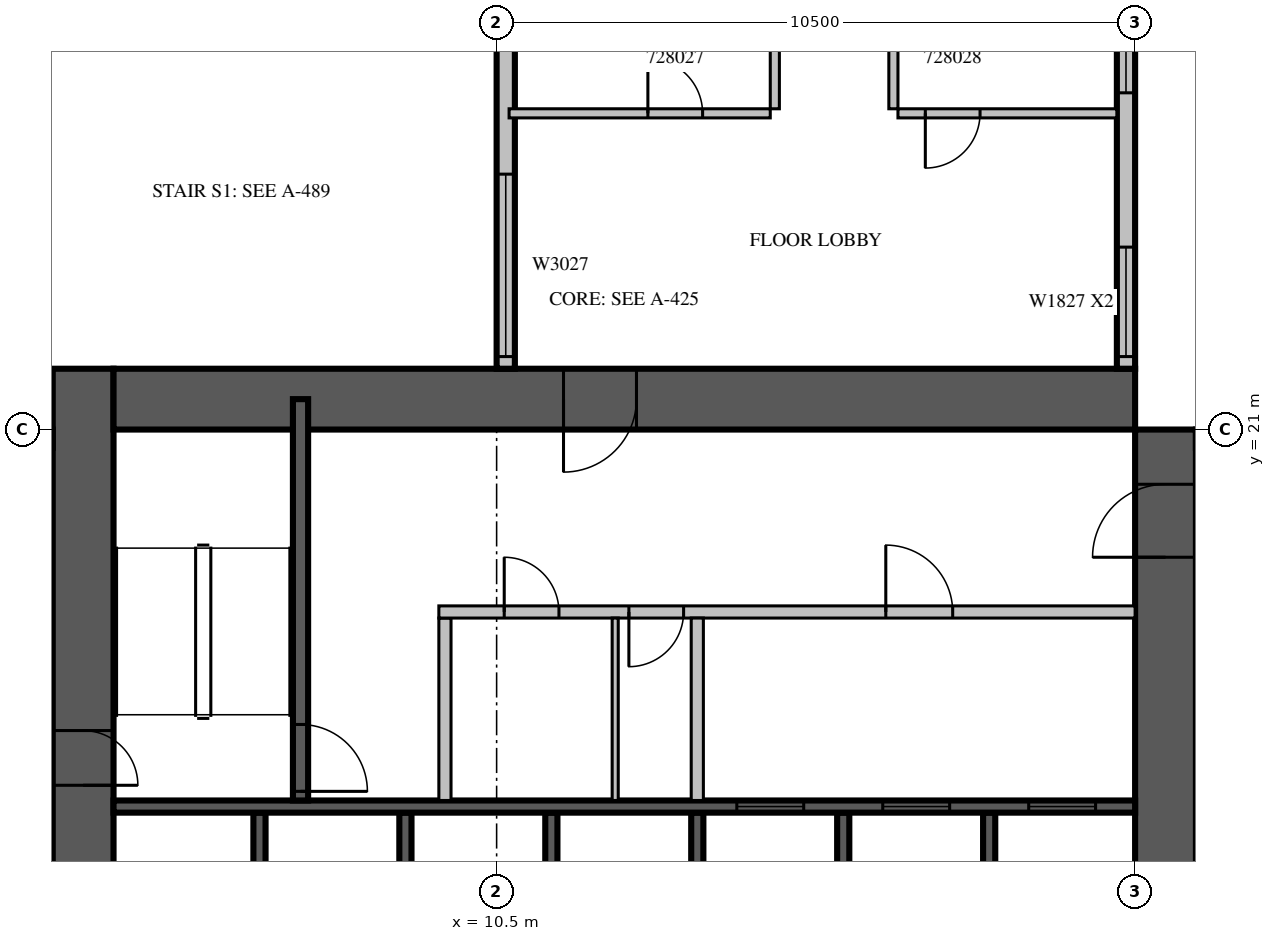
"""IFC4 building model, lengths in metres.
Left out: names, types, materials, properties, quantities, classifications, styles, units other than length and angle.
Written with IfcOpenShell. Run it as: python <this file> out.ifc"""

import sys

from ifc_helpers import new_model, si_unit, direction, frame, frame_2d, origin, place, context, subcontext, project, spatial, rectangle, extrude, source, transform, mapped, element, fill, save


model = new_model("IFC4")
c1 = context("Model", 3, precision=1e-05, world=origin(), true_north=direction((0.0, 1.0)))
c2 = subcontext(c1, "Body", "Model", "MODEL_VIEW")
j1 = project(units=[si_unit("LENGTHUNIT", "METRE"), si_unit("PLANEANGLEUNIT", "RADIAN")], contexts=[c1])
p1 = place(None, origin())
s1 = spatial("IfcSite", under=j1, at=p1, CompositionType="ELEMENT")
p2 = place(p1, origin())
s2 = spatial("IfcBuilding", under=s1, at=p2, CompositionType="ELEMENT")
p3 = place(p2, frame((0.0, 0.0, 128.7)))
s3 = spatial("IfcBuildingStorey", under=s2, at=p3, CompositionType="ELEMENT", Elevation=128.7)
m1 = source(origin(), c2, "Body", "SweptSolid", [
    extrude(rectangle(XDim=17.8, YDim=1.0, at=frame_2d((8.9, 0.0))), origin(), (0.0, 0.0, 1.0), 4.2),
])
p4 = place(p3, frame((3.7, 4.2, 0.0), z_axis=(0.0, 0.0, 1.0), x_axis=(0.0, 1.0, 0.0)))
e1 = element("IfcWall", 1, at=p4, inside=s3, PredefinedType="SHEAR", context=c2, shape_type="MappedRepresentation", body=[
    mapped(m1, transform((0.0, 0.0, 0.0), scale=1.0)),
])
m2 = source(origin(), c2, "Body", "SweptSolid", [
    extrude(rectangle(XDim=2.2, YDim=2.1, at=frame_2d((1.1, 1.05))), frame((0.0, 0.51, 0.0), z_axis=(0.0, -1.0, 0.0), x_axis=(1.0, 0.0, 0.0)), (0.0, 0.0, 1.0), 1.02),
])
p5 = place(p4, frame((4.2, 0.0, 0.0)))
e2 = element("IfcOpeningElement", 2, at=p5, cuts=e1, PredefinedType="OPENING", context=c2, shape_type="MappedRepresentation", body=[
    mapped(m2, transform((0.0, 0.0, 0.0), scale=1.0)),
])
m3 = source(origin(), c2, "Body", "SweptSolid", [
    extrude(rectangle(XDim=0.9, YDim=2.1, at=frame_2d((0.45, 1.05))), frame((0.0, 0.51, 0.0), z_axis=(0.0, -1.0, 0.0), x_axis=(1.0, 0.0, 0.0)), (0.0, 0.0, 1.0), 1.02),
])
p6 = place(p4, frame((10.95, 0.0, 0.0)))
e3 = element("IfcOpeningElement", 3, at=p6, cuts=e1, PredefinedType="OPENING", context=c2, shape_type="MappedRepresentation", body=[
    mapped(m3, transform((0.0, 0.0, 0.0), scale=1.0)),
])
m4 = source(origin(), c2, "Body", "SweptSolid", [
    extrude(rectangle(XDim=16.8, YDim=1.0, at=frame_2d((8.4, 0.0))), origin(), (0.0, 0.0, 1.0), 4.2),
])
p7 = place(p3, frame((21.5, 4.2, 0.0), z_axis=(0.0, 0.0, 1.0), x_axis=(0.0, 1.0, 0.0)))
e4 = element("IfcWall", 4, at=p7, inside=s3, PredefinedType="SHEAR", context=c2, shape_type="MappedRepresentation", body=[
    mapped(m4, transform((0.0, 0.0, 0.0), scale=1.0)),
])
p8 = place(p7, frame((4.2, 0.0, 0.0)))
e5 = element("IfcOpeningElement", 5, at=p8, cuts=e4, PredefinedType="OPENING", context=c2, shape_type="MappedRepresentation", body=[
    mapped(m2, transform((0.0, 0.0, 0.0), scale=1.0)),
])
m5 = source(origin(), c2, "Body", "SweptSolid", [
    extrude(rectangle(XDim=1.2, YDim=2.1, at=frame_2d((0.6, 1.05))), frame((0.0, 0.51, 0.0), z_axis=(0.0, -1.0, 0.0), x_axis=(1.0, 0.0, 0.0)), (0.0, 0.0, 1.0), 1.02),
])
p9 = place(p7, frame((14.7, 0.0, 0.0)))
e6 = element("IfcOpeningElement", 6, at=p9, cuts=e4, PredefinedType="OPENING", context=c2, shape_type="MappedRepresentation", body=[
    mapped(m5, transform((0.0, 0.0, 0.0), scale=1.0)),
])
p10 = place(p3, frame((4.2, 21.5, 0.0), z_axis=(0.0, 0.0, 1.0), x_axis=(1.0, 0.0, 0.0)))
e7 = element("IfcWall", 7, at=p10, inside=s3, PredefinedType="SHEAR", context=c2, shape_type="MappedRepresentation", body=[
    mapped(m4, transform((0.0, 0.0, 0.0), scale=1.0)),
])
p11 = place(p10, frame((7.4, 0.0, 0.0)))
e8 = element("IfcOpeningElement", 8, at=p11, cuts=e7, PredefinedType="OPENING", context=c2, shape_type="MappedRepresentation", body=[
    mapped(m5, transform((0.0, 0.0, 0.0), scale=1.0)),
])
m6 = source(origin(), c2, "Body", "SweptSolid", [
    extrude(rectangle(XDim=6.875, YDim=0.3, at=frame_2d((3.438, 0.0))), origin(), (0.0, 0.0, 1.0), 3.8),
])
p12 = place(p3, frame((20.85, 22.0, 0.0), z_axis=(0.0, 0.0, 1.0), x_axis=(0.0, 1.0, 0.0)))
e9 = element("IfcWall", 9, at=p12, inside=s3, PredefinedType="STANDARD", context=c2, shape_type="MappedRepresentation", body=[
    mapped(m6, transform((0.0, 0.0, 0.0), scale=1.0)),
])
m7 = source(origin(), c2, "Body", "SweptSolid", [
    extrude(rectangle(XDim=1.8, YDim=2.7, at=frame_2d((0.9, 1.35))), frame((0.0, 0.16, 0.0), z_axis=(0.0, -1.0, 0.0), x_axis=(1.0, 0.0, 0.0)), (0.0, 0.0, 1.0), 0.32),
])
p13 = place(p12, frame((0.2, 0.0, 0.6)))
e10 = element("IfcOpeningElement", 10, at=p13, cuts=e9, PredefinedType="OPENING", context=c2, shape_type="MappedRepresentation", body=[
    mapped(m7, transform((0.0, 0.0, 0.0), scale=1.0)),
])
p14 = place(p12, frame((4.537, 0.0, 0.6)))
e11 = element("IfcOpeningElement", 11, at=p14, cuts=e9, PredefinedType="OPENING", context=c2, shape_type="MappedRepresentation", body=[
    mapped(m7, transform((0.0, 0.0, 0.0), scale=1.0)),
])
p15 = place(p3, frame((10.65, 28.875, 0.0), z_axis=(0.0, 0.0, 1.0), x_axis=(0.0, -1.0, 0.0)))
e12 = element("IfcWall", 12, at=p15, inside=s3, PredefinedType="STANDARD", context=c2, shape_type="MappedRepresentation", body=[
    mapped(m6, transform((0.0, 0.0, 0.0), scale=1.0)),
])
m8 = source(origin(), c2, "Body", "SweptSolid", [
    extrude(rectangle(XDim=1.2, YDim=2.7, at=frame_2d((0.6, 1.35))), frame((0.0, 0.16, 0.0), z_axis=(0.0, -1.0, 0.0), x_axis=(1.0, 0.0, 0.0)), (0.0, 0.0, 1.0), 0.32),
])
p16 = place(p15, frame((0.375, 0.0, 0.6)))
e13 = element("IfcOpeningElement", 13, at=p16, cuts=e12, PredefinedType="OPENING", context=c2, shape_type="MappedRepresentation", body=[
    mapped(m8, transform((0.0, 0.0, 0.0), scale=1.0)),
])
m9 = source(origin(), c2, "Body", "SweptSolid", [
    extrude(rectangle(XDim=3.0, YDim=2.7, at=frame_2d((1.5, 1.35))), frame((0.0, 0.16, 0.0), z_axis=(0.0, -1.0, 0.0), x_axis=(1.0, 0.0, 0.0)), (0.0, 0.0, 1.0), 0.32),
])
p17 = place(p15, frame((3.675, 0.0, 0.6)))
e14 = element("IfcOpeningElement", 14, at=p17, cuts=e12, PredefinedType="OPENING", context=c2, shape_type="MappedRepresentation", body=[
    mapped(m9, transform((0.0, 0.0, 0.0), scale=1.0)),
])
m10 = source(origin(), c2, "Body", "SweptSolid", [
    extrude(rectangle(XDim=3.0, YDim=0.2, at=frame_2d((1.5, 0.0))), origin(), (0.0, 0.0, 1.0), 4.2),
])
for number, where, z_axis, x_axis in (
    (15, (6.6, 11.7, 0.0), (0.0, 0.0, 1.0), (0.0, 1.0, 0.0)),
    (16, (9.0, 11.7, 0.0), (0.0, 0.0, 1.0), (0.0, 1.0, 0.0)),
    (17, (11.4, 11.7, 0.0), (0.0, 0.0, 1.0), (0.0, 1.0, 0.0)),
    (18, (13.8, 11.7, 0.0), (0.0, 0.0, 1.0), (0.0, 1.0, 0.0)),
    (19, (16.2, 11.7, 0.0), (0.0, 0.0, 1.0), (0.0, 1.0, 0.0)),
    (20, (18.6, 11.7, 0.0), (0.0, 0.0, 1.0), (0.0, 1.0, 0.0)),
):
    element("IfcWall", number, at=place(p3, frame(where, z_axis=z_axis, x_axis=x_axis)), inside=s3, PredefinedType="SOLIDWALL", context=c2, shape_type="MappedRepresentation", body=[
        mapped(m10, transform((0.0, 0.0, 0.0), scale=1.0)),
    ])
m11 = source(origin(), c2, "Body", "SweptSolid", [
    extrude(rectangle(XDim=16.8, YDim=0.2, at=frame_2d((8.4, 0.0))), origin(), (0.0, 0.0, 1.0), 4.2),
])
p18 = place(p3, frame((4.2, 14.8, 0.0), z_axis=(0.0, 0.0, 1.0), x_axis=(1.0, 0.0, 0.0)))
e21 = element("IfcWall", 21, at=p18, inside=s3, PredefinedType="SOLIDWALL", context=c2, shape_type="MappedRepresentation", body=[
    mapped(m11, transform((0.0, 0.0, 0.0), scale=1.0)),
])
m12 = source(origin(), c2, "Body", "SweptSolid", [
    extrude(rectangle(XDim=1.1, YDim=2.1, at=frame_2d((0.55, 1.05))), frame((0.0, 0.11, 0.0), z_axis=(0.0, -1.0, 0.0), x_axis=(1.0, 0.0, 0.0)), (0.0, 0.0, 1.0), 0.22),
])
p19 = place(p18, frame((10.25, 0.0, 0.0)))
e22 = element("IfcOpeningElement", 22, at=p19, cuts=e21, PredefinedType="OPENING", context=c2, shape_type="MappedRepresentation", body=[
    mapped(m12, transform((0.0, 0.0, 0.0), scale=1.0)),
])
p20 = place(p18, frame((12.65, 0.0, 0.0)))
e23 = element("IfcOpeningElement", 23, at=p20, cuts=e21, PredefinedType="OPENING", context=c2, shape_type="MappedRepresentation", body=[
    mapped(m12, transform((0.0, 0.0, 0.0), scale=1.0)),
])
p21 = place(p18, frame((15.05, 0.0, 0.0)))
e24 = element("IfcOpeningElement", 24, at=p21, cuts=e21, PredefinedType="OPENING", context=c2, shape_type="MappedRepresentation", body=[
    mapped(m12, transform((0.0, 0.0, 0.0), scale=1.0)),
])
m13 = source(origin(), c2, "Body", "SweptSolid", [
    extrude(rectangle(XDim=6.6, YDim=0.25, at=frame_2d((3.3, 0.0))), origin(), (0.0, 0.0, 1.0), 3.8),
])
p22 = place(p3, frame((7.275, 14.9, 0.0), z_axis=(0.0, 0.0, 1.0), x_axis=(0.0, 1.0, 0.0)))
e25 = element("IfcWall", 25, at=p22, inside=s3, PredefinedType="SOLIDWALL", context=c2, shape_type="MappedRepresentation", body=[
    mapped(m13, transform((0.0, 0.0, 0.0), scale=1.0)),
])
m14 = source(origin(), c2, "Body", "SweptSolid", [
    extrude(rectangle(XDim=1.1, YDim=2.1, at=frame_2d((0.55, 1.05))), frame((0.0, 0.135, 0.0), z_axis=(0.0, -1.0, 0.0), x_axis=(1.0, 0.0, 0.0)), (0.0, 0.0, 1.0), 0.27),
])
p23 = place(p22, frame((0.15, 0.0, 0.0)))
e26 = element("IfcOpeningElement", 26, at=p23, cuts=e25, PredefinedType="OPENING", context=c2, shape_type="MappedRepresentation", body=[
    mapped(m14, transform((0.0, 0.0, 0.0), scale=1.0)),
])
m15 = source(origin(), c2, "Body", "SweptSolid", [
    extrude(rectangle(XDim=3.0, YDim=0.2, at=frame_2d((1.5, 0.0))), origin(), (0.0, 0.0, 1.0), 3.8),
])
p24 = place(p3, frame((9.65, 14.9, 0.0), z_axis=(0.0, 0.0, 1.0), x_axis=(0.0, 1.0, 0.0)))
e27 = element("IfcWall", 27, at=p24, inside=s3, PredefinedType="PARTITIONING", context=c2, shape_type="MappedRepresentation", body=[
    mapped(m15, transform((0.0, 0.0, 0.0), scale=1.0)),
])
m16 = source(origin(), c2, "Body", "SweptSolid", [
    extrude(rectangle(XDim=11.45, YDim=0.2, at=frame_2d((5.725, 0.0))), origin(), (0.0, 0.0, 1.0), 3.8),
])
p25 = place(p3, frame((9.55, 18.0, 0.0), z_axis=(0.0, 0.0, 1.0), x_axis=(1.0, 0.0, 0.0)))
e28 = element("IfcWall", 28, at=p25, inside=s3, PredefinedType="PARTITIONING", context=c2, shape_type="MappedRepresentation", body=[
    mapped(m16, transform((0.0, 0.0, 0.0), scale=1.0)),
])
m17 = source(origin(), c2, "Body", "SweptSolid", [
    extrude(rectangle(XDim=0.9, YDim=2.1, at=frame_2d((0.45, 1.05))), frame((0.0, 0.11, 0.0), z_axis=(0.0, -1.0, 0.0), x_axis=(1.0, 0.0, 0.0)), (0.0, 0.0, 1.0), 0.22),
])
p26 = place(p25, frame((1.075, 0.0, 0.0)))
e29 = element("IfcOpeningElement", 29, at=p26, cuts=e28, PredefinedType="OPENING", context=c2, shape_type="MappedRepresentation", body=[
    mapped(m17, transform((0.0, 0.0, 0.0), scale=1.0)),
])
p27 = place(p25, frame((3.125, 0.0, 0.0)))
e30 = element("IfcOpeningElement", 30, at=p27, cuts=e28, PredefinedType="OPENING", context=c2, shape_type="MappedRepresentation", body=[
    mapped(m17, transform((0.0, 0.0, 0.0), scale=1.0)),
])
p28 = place(p25, frame((7.35, 0.0, 0.0)))
e31 = element("IfcOpeningElement", 31, at=p28, cuts=e28, PredefinedType="OPENING", context=c2, shape_type="MappedRepresentation", body=[
    mapped(m12, transform((0.0, 0.0, 0.0), scale=1.0)),
])
p29 = place(p3, frame((13.8, 14.9, 0.0), z_axis=(0.0, 0.0, 1.0), x_axis=(0.0, 1.0, 0.0)))
e32 = element("IfcWall", 32, at=p29, inside=s3, PredefinedType="PARTITIONING", context=c2, shape_type="MappedRepresentation", body=[
    mapped(m15, transform((0.0, 0.0, 0.0), scale=1.0)),
])
m18 = source(origin(), c2, "Body", "SweptSolid", [
    extrude(rectangle(XDim=3.0, YDim=0.1, at=frame_2d((1.5, 0.0))), origin(), (0.0, 0.0, 1.0), 3.8),
])
p30 = place(p3, frame((12.45, 14.9, 0.0), z_axis=(0.0, 0.0, 1.0), x_axis=(0.0, 1.0, 0.0)))
e33 = element("IfcWall", 33, at=p30, inside=s3, PredefinedType="PARTITIONING", context=c2, shape_type="MappedRepresentation", body=[
    mapped(m18, transform((0.0, 0.0, 0.0), scale=1.0)),
])
m19 = source(origin(), c2, "Body", "SweptSolid", [
    extrude(rectangle(XDim=4.295, YDim=0.15, at=frame_2d((2.147, 0.0))), origin(), (0.0, 0.0, 1.0), 3.8),
])
p31 = place(p3, frame((10.705, 26.2, 0.0), z_axis=(0.0, 0.0, 1.0), x_axis=(1.0, 0.0, 0.0)))
e34 = element("IfcWall", 34, at=p31, inside=s3, PredefinedType="PARTITIONING", context=c2, shape_type="MappedRepresentation", body=[
    mapped(m19, transform((0.0, 0.0, 0.0), scale=1.0)),
])
m20 = source(origin(), c2, "Body", "SweptSolid", [
    extrude(rectangle(XDim=0.9, YDim=2.1, at=frame_2d((0.45, 1.05))), frame((0.0, 0.085, 0.0), z_axis=(0.0, -1.0, 0.0), x_axis=(1.0, 0.0, 0.0)), (0.0, 0.0, 1.0), 0.17),
])
p32 = place(p31, frame((2.283, 0.0, 0.0)))
e35 = element("IfcOpeningElement", 35, at=p32, cuts=e34, PredefinedType="OPENING", context=c2, shape_type="MappedRepresentation", body=[
    mapped(m20, transform((0.0, 0.0, 0.0), scale=1.0)),
])
m21 = source(origin(), c2, "Body", "SweptSolid", [
    extrude(rectangle(XDim=3.6, YDim=0.15, at=frame_2d((1.8, 0.0))), origin(), (0.0, 0.0, 1.0), 3.8),
])
p33 = place(p3, frame((17.1, 26.2, 0.0), z_axis=(0.0, 0.0, 1.0), x_axis=(1.0, 0.0, 0.0)))
e36 = element("IfcWall", 36, at=p33, inside=s3, PredefinedType="PARTITIONING", context=c2, shape_type="MappedRepresentation", body=[
    mapped(m21, transform((0.0, 0.0, 0.0), scale=1.0)),
])
p34 = place(p33, frame((0.45, 0.0, 0.0)))
e37 = element("IfcOpeningElement", 37, at=p34, cuts=e36, PredefinedType="OPENING", context=c2, shape_type="MappedRepresentation", body=[
    mapped(m20, transform((0.0, 0.0, 0.0), scale=1.0)),
])
m22 = source(origin(), c2, "Body", "SweptSolid", [
    extrude(rectangle(XDim=3.05, YDim=0.15, at=frame_2d((1.525, 0.0))), origin(), (0.0, 0.0, 1.0), 3.8),
])
for number, where, z_axis, x_axis in (
    (38, (15.075, 26.275, 0.0), (0.0, 0.0, 1.0), (0.0, 1.0, 0.0)),
    (39, (17.025, 29.325, 0.0), (0.0, 0.0, 1.0), (0.0, -1.0, 0.0)),
):
    element("IfcWall", number, at=place(p3, frame(where, z_axis=z_axis, x_axis=x_axis)), inside=s3, PredefinedType="PARTITIONING", context=c2, shape_type="MappedRepresentation", body=[
        mapped(m22, transform((0.0, 0.0, 0.0), scale=1.0)),
    ])
m23 = source(origin(), c2, "Body", "SweptSolid", [
    extrude(rectangle(XDim=1.8, YDim=2.7, at=frame_2d((0.9, 1.35))), frame((0.0, 0.03, 0.0), z_axis=(0.0, -1.0, 0.0), x_axis=(1.0, 0.0, 0.0)), (0.0, 0.0, 1.0), 0.06),
])
p35 = place(p13, origin())
e40 = element("IfcWindow", 40, at=p35, inside=s3, PartitioningType="SINGLE_PANEL", PredefinedType="WINDOW", context=c2, shape_type="MappedRepresentation", body=[
    mapped(m23, transform((0.0, 0.0, 0.0), scale=1.0)),
])
fill(e10, e40)
p36 = place(p14, origin())
e41 = element("IfcWindow", 41, at=p36, inside=s3, PartitioningType="SINGLE_PANEL", PredefinedType="WINDOW", context=c2, shape_type="MappedRepresentation", body=[
    mapped(m23, transform((0.0, 0.0, 0.0), scale=1.0)),
])
fill(e11, e41)
m24 = source(origin(), c2, "Body", "SweptSolid", [
    extrude(rectangle(XDim=3.0, YDim=2.7, at=frame_2d((1.5, 1.35))), frame((0.0, 0.03, 0.0), z_axis=(0.0, -1.0, 0.0), x_axis=(1.0, 0.0, 0.0)), (0.0, 0.0, 1.0), 0.06),
])
p37 = place(p17, origin())
e42 = element("IfcWindow", 42, at=p37, inside=s3, PartitioningType="SINGLE_PANEL", PredefinedType="WINDOW", context=c2, shape_type="MappedRepresentation", body=[
    mapped(m24, transform((0.0, 0.0, 0.0), scale=1.0)),
])
fill(e14, e42)
m25 = source(origin(), c2, "Body", "SweptSolid", [
    extrude(rectangle(XDim=1.1, YDim=2.1, at=frame_2d((0.55, 1.05))), frame((0.0, 0.025, 0.0), z_axis=(0.0, -1.0, 0.0), x_axis=(1.0, 0.0, 0.0)), (0.0, 0.0, 1.0), 0.05),
])
p38 = place(p19, origin())
e43 = element("IfcDoor", 43, at=p38, inside=s3, OperationType="SLIDING_TO_LEFT", PredefinedType="DOOR", context=c2, shape_type="MappedRepresentation", body=[
    mapped(m25, transform((0.0, 0.0, 0.0), scale=1.0)),
])
fill(e22, e43)
p39 = place(p20, origin())
e44 = element("IfcDoor", 44, at=p39, inside=s3, OperationType="SLIDING_TO_LEFT", PredefinedType="DOOR", context=c2, shape_type="MappedRepresentation", body=[
    mapped(m25, transform((0.0, 0.0, 0.0), scale=1.0)),
])
fill(e23, e44)
p40 = place(p21, origin())
e45 = element("IfcDoor", 45, at=p40, inside=s3, OperationType="SLIDING_TO_LEFT", PredefinedType="DOOR", context=c2, shape_type="MappedRepresentation", body=[
    mapped(m25, transform((0.0, 0.0, 0.0), scale=1.0)),
])
fill(e24, e45)
p41 = place(p23, origin())
e46 = element("IfcDoor", 46, at=p41, inside=s3, OperationType="SINGLE_SWING_RIGHT", PredefinedType="DOOR", context=c2, shape_type="MappedRepresentation", body=[
    mapped(m25, transform((0.0, 0.0, 0.0), scale=1.0)),
])
fill(e26, e46)
m26 = source(origin(), c2, "Body", "SweptSolid", [
    extrude(rectangle(XDim=0.9, YDim=2.1, at=frame_2d((0.45, 1.05))), frame((0.0, 0.025, 0.0), z_axis=(0.0, -1.0, 0.0), x_axis=(1.0, 0.0, 0.0)), (0.0, 0.0, 1.0), 0.05),
])
p42 = place(p26, origin())
e47 = element("IfcDoor", 47, at=p42, inside=s3, OperationType="SINGLE_SWING_LEFT", PredefinedType="DOOR", context=c2, shape_type="MappedRepresentation", body=[
    mapped(m26, transform((0.0, 0.0, 0.0), scale=1.0)),
])
fill(e29, e47)
p43 = place(p27, origin())
e48 = element("IfcDoor", 48, at=p43, inside=s3, OperationType="SINGLE_SWING_RIGHT", PredefinedType="DOOR", context=c2, shape_type="MappedRepresentation", body=[
    mapped(m26, transform((0.0, 0.0, 0.0), scale=1.0)),
])
fill(e30, e48)
p44 = place(p28, origin())
e49 = element("IfcDoor", 49, at=p44, inside=s3, OperationType="SINGLE_SWING_LEFT", PredefinedType="DOOR", context=c2, shape_type="MappedRepresentation", body=[
    mapped(m25, transform((0.0, 0.0, 0.0), scale=1.0)),
])
fill(e31, e49)
m27 = source(origin(), c2, "Body", "SweptSolid", [
    extrude(rectangle(XDim=1.2, YDim=2.1, at=frame_2d((0.6, 1.05))), frame((0.0, 0.025, 0.0), z_axis=(0.0, -1.0, 0.0), x_axis=(1.0, 0.0, 0.0)), (0.0, 0.0, 1.0), 0.05),
])
p45 = place(p11, origin())
e50 = element("IfcDoor", 50, at=p45, inside=s3, OperationType="SINGLE_SWING_RIGHT", PredefinedType="DOOR", context=c2, shape_type="MappedRepresentation", body=[
    mapped(m27, transform((0.0, 0.0, 0.0), scale=1.0)),
])
fill(e8, e50)
p46 = place(p9, origin())
e51 = element("IfcDoor", 51, at=p46, inside=s3, OperationType="SINGLE_SWING_LEFT", PredefinedType="DOOR", context=c2, shape_type="MappedRepresentation", body=[
    mapped(m27, transform((0.0, 0.0, 0.0), scale=1.0)),
])
fill(e6, e51)
p47 = place(p6, origin())
e52 = element("IfcDoor", 52, at=p47, inside=s3, OperationType="SINGLE_SWING_RIGHT", PredefinedType="DOOR", context=c2, shape_type="MappedRepresentation", body=[
    mapped(m26, transform((0.0, 0.0, 0.0), scale=1.0)),
])
fill(e3, e52)
p48 = place(p32, origin())
e53 = element("IfcDoor", 53, at=p48, inside=s3, OperationType="SINGLE_SWING_LEFT", PredefinedType="DOOR", context=c2, shape_type="MappedRepresentation", body=[
    mapped(m26, transform((0.0, 0.0, 0.0), scale=1.0)),
])
fill(e35, e53)
p49 = place(p34, origin())
e54 = element("IfcDoor", 54, at=p49, inside=s3, OperationType="SINGLE_SWING_RIGHT", PredefinedType="DOOR", context=c2, shape_type="MappedRepresentation", body=[
    mapped(m26, transform((0.0, 0.0, 0.0), scale=1.0)),
])
fill(e37, e54)
save(model, sys.argv[1])
